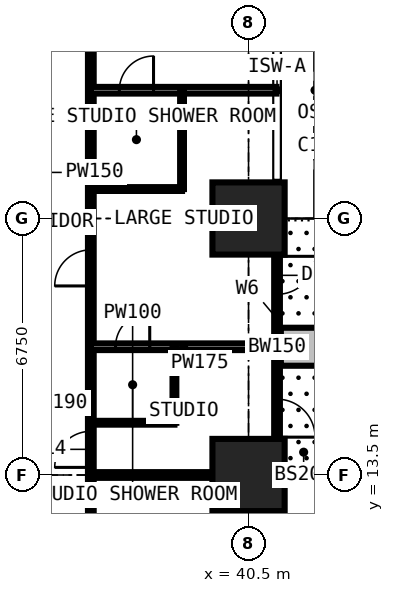
"""IFC4 building model, lengths in metres.
Left out: names, types, materials, properties, quantities, classifications, styles, units other than length and angle.
Written with IfcOpenShell. Run it as: python <this file> out.ifc"""

import sys

from ifc_helpers import new_model, si_unit, direction, frame, frame_2d, origin, origin_2d, place, context, subcontext, project, spatial, rectangle, extrude, element, fill, save


model = new_model("IFC4")
c1 = context("Model", 3, precision=1e-05, world=origin(), true_north=direction((0.0, 1.0)))
c2 = subcontext(c1, "Body", "Model", "MODEL_VIEW")
j1 = project(units=[si_unit("LENGTHUNIT", "METRE"), si_unit("PLANEANGLEUNIT", "RADIAN")], contexts=[c1])
p1 = place(None, origin())
s1 = spatial("IfcSite", under=j1, at=p1, CompositionType="ELEMENT")
p2 = place(p1, origin())
s2 = spatial("IfcBuilding", under=s1, at=p2, CompositionType="ELEMENT")
p3 = place(p2, frame((0.0, 0.0, 18.0)))
s3 = spatial("IfcBuildingStorey", under=s2, at=p3, CompositionType="ELEMENT", Elevation=18.0)
for number, where, z_axis, x_axis in (
    (1, (40.5, 13.5, 0.0), (0.0, 0.0, 1.0), (1.0, 0.0, 0.0)),
    (2, (40.5, 20.25, 0.0), (0.0, 0.0, 1.0), (1.0, 0.0, 0.0)),
):
    element("IfcColumn", number, at=place(p3, frame(where, z_axis=z_axis, x_axis=x_axis)), inside=s3, PredefinedType="COLUMN", context=c2, shape_type="SweptSolid", body=[
        extrude(rectangle(XDim=1.9, YDim=1.9, at=origin_2d()), origin(), (0.0, 0.0, 1.0), 3.6),
    ])
p4 = place(p3, frame((41.25, 20.25, 0.0), z_axis=(0.0, 0.0, 1.0), x_axis=(0.0, -1.0, 0.0)))
e3 = element("IfcWall", 3, at=p4, inside=s3, PredefinedType="SOLIDWALL", context=c2, shape_type="SweptSolid", body=[
    extrude(rectangle(XDim=6.75, YDim=0.15, at=frame_2d((3.375, 0.0))), origin(), (0.0, 0.0, 1.0), 3.375),
])
p5 = place(p4, frame((0.996, 0.0, 0.0)))
e4 = element("IfcOpeningElement", 4, at=p5, cuts=e3, PredefinedType="OPENING", context=c2, shape_type="SweptSolid", body=[
    extrude(rectangle(XDim=1.0, YDim=2.2, at=frame_2d((0.5, 1.1))), frame((0.0, 0.085, 0.0), z_axis=(0.0, -1.0, 0.0), x_axis=(1.0, 0.0, 0.0)), (0.0, 0.0, 1.0), 0.17),
])
p6 = place(p4, frame((2.042, 0.0, 0.9)))
e5 = element("IfcOpeningElement", 5, at=p6, cuts=e3, PredefinedType="OPENING", context=c2, shape_type="SweptSolid", body=[
    extrude(rectangle(XDim=1.2, YDim=1.8, at=frame_2d((0.6, 0.9))), frame((0.0, 0.085, 0.0), z_axis=(0.0, -1.0, 0.0), x_axis=(1.0, 0.0, 0.0)), (0.0, 0.0, 1.0), 0.17),
])
p7 = place(p4, frame((4.754, 0.0, 0.0)))
e6 = element("IfcOpeningElement", 6, at=p7, cuts=e3, PredefinedType="OPENING", context=c2, shape_type="SweptSolid", body=[
    extrude(rectangle(XDim=1.0, YDim=2.2, at=frame_2d((0.5, 1.1))), frame((0.0, 0.085, 0.0), z_axis=(0.0, -1.0, 0.0), x_axis=(1.0, 0.0, 0.0)), (0.0, 0.0, 1.0), 0.17),
])
p8 = place(p4, frame((3.508, 0.0, 0.9)))
e7 = element("IfcOpeningElement", 7, at=p8, cuts=e3, PredefinedType="OPENING", context=c2, shape_type="SweptSolid", body=[
    extrude(rectangle(XDim=1.2, YDim=1.8, at=frame_2d((0.6, 0.9))), frame((0.0, 0.085, 0.0), z_axis=(0.0, -1.0, 0.0), x_axis=(1.0, 0.0, 0.0)), (0.0, 0.0, 1.0), 0.17),
])
p9 = place(p3, frame((41.35, 16.875, 0.0), z_axis=(0.0, 0.0, 1.0), x_axis=(1.0, 0.0, 0.0)))
e8 = element("IfcWall", 8, at=p9, inside=s3, PredefinedType="USERDEFINED", context=c2, shape_type="SweptSolid", body=[
    extrude(rectangle(XDim=2.2, YDim=1.0, at=frame_2d((1.1, 0.0))), origin(), (0.0, 0.0, 1.0), 0.9),
])
p10 = place(p3, frame((36.35, 6.75, 0.0), z_axis=(0.0, 0.0, 1.0), x_axis=(0.0, 1.0, 0.0)))
e9 = element("IfcWall", 9, at=p10, inside=s3, PredefinedType="PARTITIONING", context=c2, shape_type="SweptSolid", body=[
    extrude(rectangle(XDim=23.625, YDim=0.15, at=frame_2d((11.812, 0.0))), origin(), (0.0, 0.0, 1.0), 3.375),
])
p11 = place(p10, frame((18.475, 0.0, 0.0)))
e10 = element("IfcOpeningElement", 10, at=p11, cuts=e9, PredefinedType="OPENING", context=c2, shape_type="SweptSolid", body=[
    extrude(rectangle(XDim=0.95, YDim=2.2, at=frame_2d((0.475, 1.1))), frame((0.0, 0.085, 0.0), z_axis=(0.0, -1.0, 0.0), x_axis=(1.0, 0.0, 0.0)), (0.0, 0.0, 1.0), 0.17),
])
p12 = place(p10, frame((11.725, 0.0, 0.0)))
e11 = element("IfcOpeningElement", 11, at=p12, cuts=e9, PredefinedType="OPENING", context=c2, shape_type="SweptSolid", body=[
    extrude(rectangle(XDim=0.95, YDim=2.2, at=frame_2d((0.475, 1.1))), frame((0.0, 0.085, 0.0), z_axis=(0.0, -1.0, 0.0), x_axis=(1.0, 0.0, 0.0)), (0.0, 0.0, 1.0), 0.17),
])
p13 = place(p10, frame((6.95, 0.0, 0.0)))
e12 = element("IfcOpeningElement", 12, at=p13, cuts=e9, PredefinedType="OPENING", context=c2, shape_type="SweptSolid", body=[
    extrude(rectangle(XDim=0.95, YDim=2.2, at=frame_2d((0.475, 1.1))), frame((0.0, 0.085, 0.0), z_axis=(0.0, -1.0, 0.0), x_axis=(1.0, 0.0, 0.0)), (0.0, 0.0, 1.0), 0.17),
])
p14 = place(p3, frame((36.35, 13.5, 0.0), z_axis=(0.0, 0.0, 1.0), x_axis=(1.0, 0.0, 0.0)))
e13 = element("IfcWall", 13, at=p14, inside=s3, PredefinedType="PARTITIONING", context=c2, shape_type="SweptSolid", body=[
    extrude(rectangle(XDim=4.884, YDim=0.15, at=frame_2d((2.442, 0.0))), origin(), (0.0, 0.0, 1.0), 2.877),
])
p15 = place(p3, frame((36.35, 14.875, 0.0), z_axis=(0.0, 0.0, 1.0), x_axis=(1.0, 0.0, 0.0)))
e14 = element("IfcWall", 14, at=p15, inside=s3, PredefinedType="PARTITIONING", context=c2, shape_type="SweptSolid", body=[
    extrude(rectangle(XDim=2.2, YDim=0.1, at=frame_2d((1.1, 0.0))), origin(), (0.0, 0.0, 1.0), 3.375),
])
p16 = place(p3, frame((36.35, 16.875, 0.0), z_axis=(0.0, 0.0, 1.0), x_axis=(1.0, 0.0, 0.0)))
e15 = element("IfcWall", 15, at=p16, inside=s3, PredefinedType="PARTITIONING", context=c2, shape_type="SweptSolid", body=[
    extrude(rectangle(XDim=4.884, YDim=0.175, at=frame_2d((2.442, 0.0))), origin(), (0.0, 0.0, 1.0), 3.375),
])
p17 = place(p16, frame((0.65, 0.0, 0.0)))
e16 = element("IfcOpeningElement", 16, at=p17, cuts=e15, PredefinedType="OPENING", context=c2, shape_type="SweptSolid", body=[
    extrude(rectangle(XDim=0.9, YDim=2.2, at=frame_2d((0.45, 1.1))), frame((0.0, 0.097, 0.0), z_axis=(0.0, -1.0, 0.0), x_axis=(1.0, 0.0, 0.0)), (0.0, 0.0, 1.0), 0.195),
])
p18 = place(p3, frame((36.35, 21.025, 0.0), z_axis=(0.0, 0.0, 1.0), x_axis=(1.0, 0.0, 0.0)))
e17 = element("IfcWall", 17, at=p18, inside=s3, PredefinedType="PARTITIONING", context=c2, shape_type="SweptSolid", body=[
    extrude(rectangle(XDim=2.4, YDim=0.1, at=frame_2d((1.2, 0.0))), origin(), (0.0, 0.0, 1.0), 3.375),
])
p19 = place(p3, frame((36.35, 23.625, 0.0), z_axis=(0.0, 0.0, 1.0), x_axis=(1.0, 0.0, 0.0)))
e18 = element("IfcWall", 18, at=p19, inside=s3, PredefinedType="PARTITIONING", context=c2, shape_type="SweptSolid", body=[
    extrude(rectangle(XDim=4.884, YDim=0.175, at=frame_2d((2.442, 0.0))), origin(), (0.0, 0.0, 1.0), 3.375),
])
p20 = place(p19, frame((0.75, 0.0, 0.0)))
e19 = element("IfcOpeningElement", 19, at=p20, cuts=e18, PredefinedType="OPENING", context=c2, shape_type="SweptSolid", body=[
    extrude(rectangle(XDim=0.9, YDim=2.2, at=frame_2d((0.45, 1.1))), frame((0.0, 0.097, 0.0), z_axis=(0.0, -1.0, 0.0), x_axis=(1.0, 0.0, 0.0)), (0.0, 0.0, 1.0), 0.195),
])
p21 = place(p3, frame((38.55, 14.875, 0.0), z_axis=(0.0, 0.0, 1.0), x_axis=(0.0, 1.0, 0.0)))
e20 = element("IfcWall", 20, at=p21, inside=s3, PredefinedType="PARTITIONING", context=c2, shape_type="SweptSolid", body=[
    extrude(rectangle(XDim=2.0, YDim=0.1, at=frame_2d((1.0, 0.0))), origin(), (0.0, 0.0, 1.0), 3.375),
])
p22 = place(p3, frame((38.75, 21.025, 0.0), z_axis=(0.0, 0.0, 1.0), x_axis=(0.0, 1.0, 0.0)))
e21 = element("IfcWall", 21, at=p22, inside=s3, PredefinedType="PARTITIONING", context=c2, shape_type="SweptSolid", body=[
    extrude(rectangle(XDim=2.6, YDim=0.1, at=frame_2d((1.3, 0.0))), origin(), (0.0, 0.0, 1.0), 3.375),
])
p23 = place(p5, origin())
e22 = element("IfcDoor", 22, at=p23, inside=s3, OperationType="SINGLE_SWING_LEFT", PredefinedType="DOOR", context=c2, shape_type="SweptSolid", body=[
    extrude(rectangle(XDim=1.0, YDim=2.2, at=frame_2d((0.5, 1.1))), frame((0.0, 0.025, 0.0), z_axis=(0.0, -1.0, 0.0), x_axis=(1.0, 0.0, 0.0)), (0.0, 0.0, 1.0), 0.05),
])
fill(e4, e22)
p24 = place(p6, origin())
e23 = element("IfcWindow", 23, at=p24, inside=s3, PartitioningType="SINGLE_PANEL", PredefinedType="WINDOW", context=c2, shape_type="SweptSolid", body=[
    extrude(rectangle(XDim=1.2, YDim=1.8, at=frame_2d((0.6, 0.9))), frame((0.0, 0.03, 0.0), z_axis=(0.0, -1.0, 0.0), x_axis=(1.0, 0.0, 0.0)), (0.0, 0.0, 1.0), 0.06),
])
fill(e5, e23)
p25 = place(p7, origin())
e24 = element("IfcDoor", 24, at=p25, inside=s3, OperationType="SINGLE_SWING_RIGHT", PredefinedType="DOOR", context=c2, shape_type="SweptSolid", body=[
    extrude(rectangle(XDim=1.0, YDim=2.2, at=frame_2d((0.5, 1.1))), frame((0.0, 0.025, 0.0), z_axis=(0.0, -1.0, 0.0), x_axis=(1.0, 0.0, 0.0)), (0.0, 0.0, 1.0), 0.05),
])
fill(e6, e24)
p26 = place(p8, origin())
e25 = element("IfcWindow", 25, at=p26, inside=s3, PartitioningType="SINGLE_PANEL", PredefinedType="WINDOW", context=c2, shape_type="SweptSolid", body=[
    extrude(rectangle(XDim=1.2, YDim=1.8, at=frame_2d((0.6, 0.9))), frame((0.0, 0.03, 0.0), z_axis=(0.0, -1.0, 0.0), x_axis=(1.0, 0.0, 0.0)), (0.0, 0.0, 1.0), 0.06),
])
fill(e7, e25)
p27 = place(p12, origin())
e26 = element("IfcDoor", 26, at=p27, inside=s3, OperationType="SINGLE_SWING_LEFT", PredefinedType="DOOR", context=c2, shape_type="SweptSolid", body=[
    extrude(rectangle(XDim=0.95, YDim=2.2, at=frame_2d((0.475, 1.1))), frame((0.0, 0.025, 0.0), z_axis=(0.0, -1.0, 0.0), x_axis=(1.0, 0.0, 0.0)), (0.0, 0.0, 1.0), 0.05),
])
fill(e11, e26)
p28 = place(p20, origin())
e27 = element("IfcDoor", 27, at=p28, inside=s3, OperationType="SINGLE_SWING_RIGHT", PredefinedType="DOOR", context=c2, shape_type="SweptSolid", body=[
    extrude(rectangle(XDim=0.9, YDim=2.2, at=frame_2d((0.45, 1.1))), frame((0.0, 0.025, 0.0), z_axis=(0.0, -1.0, 0.0), x_axis=(1.0, 0.0, 0.0)), (0.0, 0.0, 1.0), 0.05),
])
fill(e19, e27)
p29 = place(p13, origin())
e28 = element("IfcDoor", 28, at=p29, inside=s3, OperationType="SINGLE_SWING_LEFT", PredefinedType="DOOR", context=c2, shape_type="SweptSolid", body=[
    extrude(rectangle(XDim=0.95, YDim=2.2, at=frame_2d((0.475, 1.1))), frame((0.0, 0.025, 0.0), z_axis=(0.0, -1.0, 0.0), x_axis=(1.0, 0.0, 0.0)), (0.0, 0.0, 1.0), 0.05),
])
fill(e12, e28)
p30 = place(p17, origin())
e29 = element("IfcDoor", 29, at=p30, inside=s3, OperationType="SINGLE_SWING_RIGHT", PredefinedType="DOOR", context=c2, shape_type="SweptSolid", body=[
    extrude(rectangle(XDim=0.9, YDim=2.2, at=frame_2d((0.45, 1.1))), frame((0.0, 0.025, 0.0), z_axis=(0.0, -1.0, 0.0), x_axis=(1.0, 0.0, 0.0)), (0.0, 0.0, 1.0), 0.05),
])
fill(e16, e29)
save(model, sys.argv[1])
